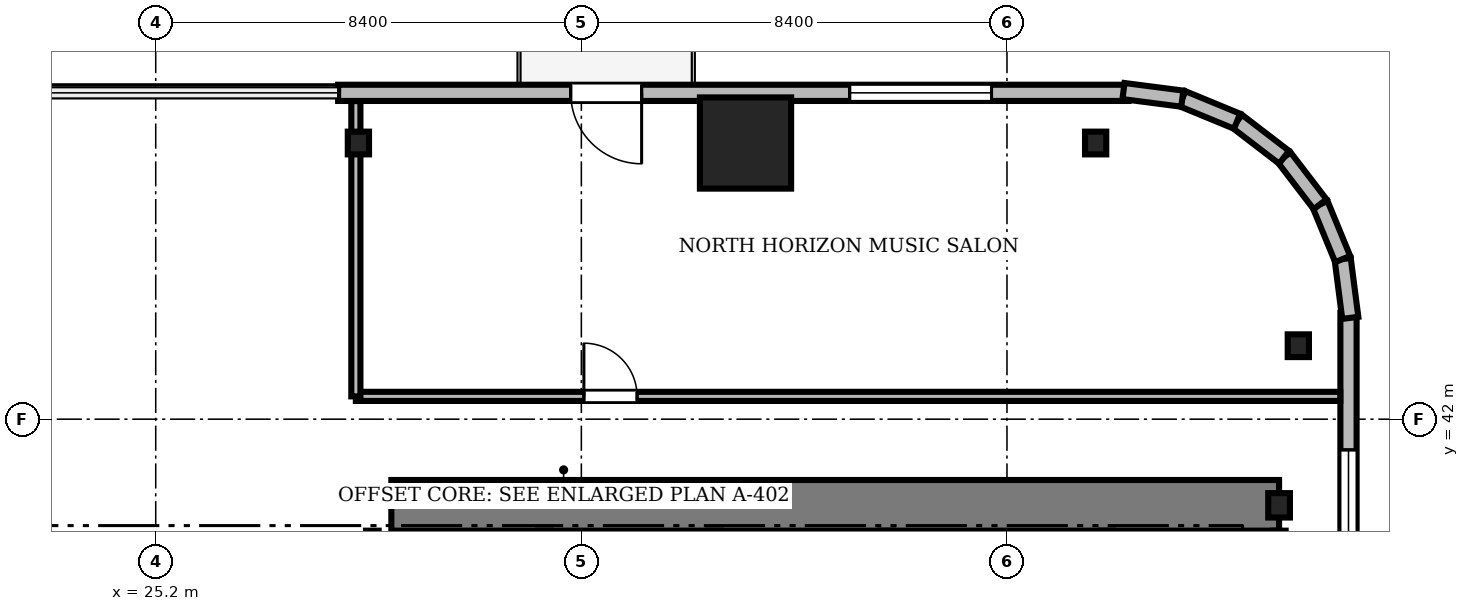
"""IFC4 building model, lengths in metres.
Left out: names, types, materials, properties, quantities, classifications, styles, units other than length and angle.
Written with IfcOpenShell. Run it as: python <this file> out.ifc"""

import sys

from ifc_helpers import new_model, si_unit, direction, frame, frame_2d, origin, origin_2d, place, context, subcontext, project, spatial, rectangle, i_section, extrude, source, transform, mapped, element, fill, save


model = new_model("IFC4")
c1 = context("Model", 3, precision=1e-05, world=origin(), true_north=direction((0.0, 1.0)))
c2 = subcontext(c1, "Body", "Model", "MODEL_VIEW")
j1 = project(units=[si_unit("LENGTHUNIT", "METRE"), si_unit("PLANEANGLEUNIT", "RADIAN")], contexts=[c1])
p1 = place(None, origin())
s1 = spatial("IfcSite", under=j1, at=p1, CompositionType="ELEMENT")
p2 = place(p1, origin())
s2 = spatial("IfcBuilding", under=s1, at=p2, CompositionType="ELEMENT")
p3 = place(p2, frame((0.0, 0.0, 86.0)))
s3 = spatial("IfcBuildingStorey", under=s2, at=p3, CompositionType="ELEMENT", Elevation=86.0)
m1 = source(origin(), c2, "Body", "SweptSolid", [
    extrude(rectangle(XDim=17.52, YDim=1.0, at=frame_2d((8.76, 0.0))), origin(), (0.0, 0.0, 1.0), 3.41),
])
p4 = place(p3, frame((29.85, 40.3, 0.0), z_axis=(0.0, 0.0, 1.0), x_axis=(1.0, 0.0, 0.0)))
e1 = element("IfcWall", 1, at=p4, inside=s3, PredefinedType="SHEAR", context=c2, shape_type="MappedRepresentation", body=[
    mapped(m1, transform((0.0, 0.0, 0.0), scale=1.0)),
])
m2 = source(origin(), c2, "Body", "SweptSolid", [
    extrude(i_section(OverallWidth=0.428, OverallDepth=0.481, WebThickness=0.04, FlangeThickness=0.063, FilletRadius=0.015, at=origin_2d()), origin(), (0.0, 0.0, 1.0), 3.41),
])
p5 = place(p3, frame((47.37, 40.3, 0.0), z_axis=(0.0, 0.0, 1.0), x_axis=(1.0, 0.0, 0.0)))
e2 = element("IfcColumn", 2, at=p5, inside=s3, PredefinedType="COLUMN", context=c2, shape_type="MappedRepresentation", body=[
    mapped(m2, transform((0.0, 0.0, 0.0), scale=1.0)),
])
m3 = source(origin(), c2, "Body", "SweptSolid", [
    extrude(rectangle(XDim=1.8, YDim=1.8, at=origin_2d()), origin(), (0.0, 0.0, 1.0), 3.41),
])
p6 = place(p3, frame((36.84, 47.45, 0.0), z_axis=(0.0, 0.0, 1.0), x_axis=(1.0, 0.0, 0.0)))
e3 = element("IfcColumn", 3, at=p6, inside=s3, PredefinedType="COLUMN", context=c2, shape_type="MappedRepresentation", body=[
    mapped(m3, transform((0.0, 0.0, 0.0), scale=1.0)),
])
m4 = source(origin(), c2, "Body", "SweptSolid", [
    extrude(i_section(OverallWidth=0.419, OverallDepth=0.449, WebThickness=0.031, FlangeThickness=0.048, FilletRadius=0.015, at=origin_2d()), origin(), (0.0, 0.0, 1.0), 3.41),
])
for number, where, z_axis, x_axis in (
    (4, (47.75, 43.45, 0.0), (0.0, 0.0, 1.0), (1.0, 0.0, 0.0)),
    (5, (43.75, 47.45, 0.0), (0.0, 0.0, 1.0), (1.0, 0.0, 0.0)),
    (6, (29.2, 47.45, 0.0), (0.0, 0.0, 1.0), (1.0, 0.0, 0.0)),
):
    element("IfcColumn", number, at=place(p3, frame(where, z_axis=z_axis, x_axis=x_axis)), inside=s3, PredefinedType="COLUMN", context=c2, shape_type="MappedRepresentation", body=[
        mapped(m4, transform((0.0, 0.0, 0.0), scale=1.0)),
    ])
m5 = source(origin(), c2, "Body", "SweptSolid", [
    extrude(rectangle(XDim=15.6, YDim=0.32, at=frame_2d((7.8, 0.0))), origin(), (0.0, 0.0, 1.0), 3.41),
])
p7 = place(p3, frame((44.4, 48.44, 0.0), z_axis=(0.0, 0.0, 1.0), x_axis=(-1.0, 0.0, 0.0)))
e7 = element("IfcWall", 7, at=p7, inside=s3, PredefinedType="SOLIDWALL", context=c2, shape_type="MappedRepresentation", body=[
    mapped(m5, transform((0.0, 0.0, 0.0), scale=1.0)),
])
m6 = source(origin(), c2, "Body", "SweptSolid", [
    extrude(rectangle(XDim=1.4, YDim=2.3, at=frame_2d((0.7, 1.15))), frame((0.0, 0.17, 0.0), z_axis=(0.0, -1.0, 0.0), x_axis=(1.0, 0.0, 0.0)), (0.0, 0.0, 1.0), 0.34),
])
p8 = place(p7, frame((9.61, 0.0, 0.0)))
e8 = element("IfcOpeningElement", 8, at=p8, cuts=e7, PredefinedType="OPENING", context=c2, shape_type="MappedRepresentation", body=[
    mapped(m6, transform((0.0, 0.0, 0.0), scale=1.0)),
])
m7 = source(origin(), c2, "Body", "SweptSolid", [
    extrude(rectangle(XDim=2.8, YDim=2.4, at=frame_2d((1.4, 1.2))), frame((0.0, 0.17, 0.0), z_axis=(0.0, -1.0, 0.0), x_axis=(1.0, 0.0, 0.0)), (0.0, 0.0, 1.0), 0.34),
])
p9 = place(p7, frame((2.705, 0.0, 0.72)))
e9 = element("IfcOpeningElement", 9, at=p9, cuts=e7, PredefinedType="OPENING", context=c2, shape_type="MappedRepresentation", body=[
    mapped(m7, transform((0.0, 0.0, 0.0), scale=1.0)),
])
m8 = source(origin(), c2, "Body", "SweptSolid", [
    extrude(rectangle(XDim=15.6, YDim=0.32, at=frame_2d((7.8, 0.0))), origin(), (0.0, 0.0, 1.0), 3.41),
])
p10 = place(p3, frame((48.74, 28.5, 0.0), z_axis=(0.0, 0.0, 1.0), x_axis=(0.0, 1.0, 0.0)))
e10 = element("IfcWall", 10, at=p10, inside=s3, PredefinedType="SOLIDWALL", context=c2, shape_type="MappedRepresentation", body=[
    mapped(m8, transform((0.0, 0.0, 0.0), scale=1.0)),
])
p11 = place(p10, frame((10.095, 0.0, 0.72)))
e11 = element("IfcOpeningElement", 11, at=p11, cuts=e10, PredefinedType="OPENING", context=c2, shape_type="MappedRepresentation", body=[
    mapped(m7, transform((0.0, 0.0, 0.0), scale=1.0)),
])
m9 = source(origin(), c2, "Body", "SweptSolid", [
    extrude(rectangle(XDim=1.17, YDim=0.32, at=frame_2d((0.585, 0.0))), origin(), (0.0, 0.0, 1.0), 3.41),
])
p12 = place(p3, frame((48.776, 44.0, 0.0), z_axis=(0.0, 0.0, 1.0), x_axis=(-0.128295670475, 0.991735963317, 0.0)))
e12 = element("IfcWall", 12, at=p12, inside=s3, PredefinedType="SOLIDWALL", context=c2, shape_type="MappedRepresentation", body=[
    mapped(m9, transform((0.0, 0.0, 0.0), scale=1.0)),
])
m10 = source(origin(), c2, "Body", "SweptSolid", [
    extrude(rectangle(XDim=1.169, YDim=0.32, at=frame_2d((0.584, 0.0))), origin(), (0.0, 0.0, 1.0), 3.41),
])
p13 = place(p3, frame((48.625, 45.16, 0.0), z_axis=(0.0, 0.0, 1.0), x_axis=(-0.381054331552, 0.924552646638, 0.0)))
e13 = element("IfcWall", 13, at=p13, inside=s3, PredefinedType="SOLIDWALL", context=c2, shape_type="MappedRepresentation", body=[
    mapped(m10, transform((0.0, 0.0, 0.0), scale=1.0)),
])
m11 = source(origin(), c2, "Body", "SweptSolid", [
    extrude(rectangle(XDim=1.169, YDim=0.32, at=frame_2d((0.584, 0.0))), origin(), (0.0, 0.0, 1.0), 3.41),
])
p14 = place(p3, frame((48.18, 46.241, 0.0), z_axis=(0.0, 0.0, 1.0), x_axis=(-0.608387696831, 0.793639975269, 0.0)))
e14 = element("IfcWall", 14, at=p14, inside=s3, PredefinedType="SOLIDWALL", context=c2, shape_type="MappedRepresentation", body=[
    mapped(m11, transform((0.0, 0.0, 0.0), scale=1.0)),
])
m12 = source(origin(), c2, "Body", "SweptSolid", [
    extrude(rectangle(XDim=1.169, YDim=0.32, at=frame_2d((0.584, 0.0))), origin(), (0.0, 0.0, 1.0), 3.41),
])
p15 = place(p3, frame((47.469, 47.169, 0.0), z_axis=(0.0, 0.0, 1.0), x_axis=(-0.793663520347, 0.608356981114, 0.0)))
e15 = element("IfcWall", 15, at=p15, inside=s3, PredefinedType="SOLIDWALL", context=c2, shape_type="MappedRepresentation", body=[
    mapped(m12, transform((0.0, 0.0, 0.0), scale=1.0)),
])
p16 = place(p3, frame((46.541, 47.88, 0.0), z_axis=(0.0, 0.0, 1.0), x_axis=(-0.924552646638, 0.381054331552, 0.0)))
e16 = element("IfcWall", 16, at=p16, inside=s3, PredefinedType="SOLIDWALL", context=c2, shape_type="MappedRepresentation", body=[
    mapped(m10, transform((0.0, 0.0, 0.0), scale=1.0)),
])
p17 = place(p3, frame((45.46, 48.325, 0.0), z_axis=(0.0, 0.0, 1.0), x_axis=(-0.991735963317, 0.128295670475, 0.0)))
e17 = element("IfcWall", 17, at=p17, inside=s3, PredefinedType="SOLIDWALL", context=c2, shape_type="MappedRepresentation", body=[
    mapped(m9, transform((0.0, 0.0, 0.0), scale=1.0)),
])
m13 = source(origin(), c2, "Body", "SweptSolid", [
    extrude(rectangle(XDim=9.15, YDim=0.25, at=frame_2d((4.575, 0.0))), origin(), (0.0, 0.0, 1.0), 3.45),
])
for number, where, z_axis, x_axis in (
    (18, (29.475, 30.65, 0.0), (0.0, 0.0, 1.0), (0.0, 1.0, 0.0)),
    (19, (32.875, 30.65, 0.0), (0.0, 0.0, 1.0), (0.0, 1.0, 0.0)),
    (20, (36.225, 30.65, 0.0), (0.0, 0.0, 1.0), (0.0, 1.0, 0.0)),
    (21, (39.625, 30.65, 0.0), (0.0, 0.0, 1.0), (0.0, 1.0, 0.0)),
    (22, (43.975, 30.65, 0.0), (0.0, 0.0, 1.0), (0.0, 1.0, 0.0)),
    (23, (47.375, 30.65, 0.0), (0.0, 0.0, 1.0), (0.0, 1.0, 0.0)),
):
    element("IfcWall", number, at=place(p3, frame(where, z_axis=z_axis, x_axis=x_axis)), inside=s3, PredefinedType="SOLIDWALL", context=c2, shape_type="MappedRepresentation", body=[
        mapped(m13, transform((0.0, 0.0, 0.0), scale=1.0)),
    ])
m14 = source(origin(), c2, "Body", "SweptSolid", [
    extrude(rectangle(XDim=19.428, YDim=0.18, at=frame_2d((9.714, 0.0))), origin(), (0.0, 0.0, 1.0), 2.652),
])
p18 = place(p3, frame((29.15, 42.45, 0.0), z_axis=(0.0, 0.0, 1.0), x_axis=(1.0, 0.0, 0.0)))
e24 = element("IfcWall", 24, at=p18, inside=s3, PredefinedType="PARTITIONING", context=c2, shape_type="MappedRepresentation", body=[
    mapped(m14, transform((0.0, 0.0, 0.0), scale=1.0)),
])
m15 = source(origin(), c2, "Body", "SweptSolid", [
    extrude(rectangle(XDim=1.05, YDim=2.2, at=frame_2d((0.525, 1.1))), frame((0.0, 0.1, 0.0), z_axis=(0.0, -1.0, 0.0), x_axis=(1.0, 0.0, 0.0)), (0.0, 0.0, 1.0), 0.2),
])
p19 = place(p18, frame((4.5, 0.0, 0.0)))
e25 = element("IfcOpeningElement", 25, at=p19, cuts=e24, PredefinedType="OPENING", context=c2, shape_type="MappedRepresentation", body=[
    mapped(m15, transform((0.0, 0.0, 0.0), scale=1.0)),
])
m16 = source(origin(), c2, "Body", "SweptSolid", [
    extrude(rectangle(XDim=5.828, YDim=0.18, at=frame_2d((2.914, 0.0))), origin(), (0.0, 0.0, 1.0), 2.652),
])
p20 = place(p3, frame((29.15, 42.45, 0.0), z_axis=(0.0, 0.0, 1.0), x_axis=(0.0, 1.0, 0.0)))
e26 = element("IfcWall", 26, at=p20, inside=s3, PredefinedType="PARTITIONING", context=c2, shape_type="MappedRepresentation", body=[
    mapped(m16, transform((0.0, 0.0, 0.0), scale=1.0)),
])
m17 = source(origin(), c2, "Body", "SweptSolid", [
    extrude(rectangle(XDim=1.4, YDim=2.3, at=frame_2d((0.7, 1.15))), frame((0.0, 0.025, 0.0), z_axis=(0.0, -1.0, 0.0), x_axis=(1.0, 0.0, 0.0)), (0.0, 0.0, 1.0), 0.05),
])
p21 = place(p8, frame((1.4, 0.0, 0.0), z_axis=(0.0, 0.0, 1.0), x_axis=(-1.0, 0.0, 0.0)))
e27 = element("IfcDoor", 27, at=p21, inside=s3, OperationType="DOUBLE_DOOR_SLIDING", PredefinedType="DOOR", context=c2, shape_type="MappedRepresentation", body=[
    mapped(m17, transform((0.0, 0.0, 0.0), scale=1.0)),
])
fill(e8, e27)
m18 = source(origin(), c2, "Body", "SweptSolid", [
    extrude(rectangle(XDim=2.8, YDim=2.4, at=frame_2d((1.4, 1.2))), frame((0.0, 0.03, 0.0), z_axis=(0.0, -1.0, 0.0), x_axis=(1.0, 0.0, 0.0)), (0.0, 0.0, 1.0), 0.06),
])
p22 = place(p9, origin())
e28 = element("IfcWindow", 28, at=p22, inside=s3, PartitioningType="SINGLE_PANEL", PredefinedType="WINDOW", context=c2, shape_type="MappedRepresentation", body=[
    mapped(m18, transform((0.0, 0.0, 0.0), scale=1.0)),
])
fill(e9, e28)
p23 = place(p11, origin())
e29 = element("IfcWindow", 29, at=p23, inside=s3, PartitioningType="SINGLE_PANEL", PredefinedType="WINDOW", context=c2, shape_type="MappedRepresentation", body=[
    mapped(m18, transform((0.0, 0.0, 0.0), scale=1.0)),
])
fill(e11, e29)
m19 = source(origin(), c2, "Body", "SweptSolid", [
    extrude(rectangle(XDim=1.05, YDim=2.2, at=frame_2d((0.525, 1.1))), frame((0.0, 0.025, 0.0), z_axis=(0.0, -1.0, 0.0), x_axis=(1.0, 0.0, 0.0)), (0.0, 0.0, 1.0), 0.05),
])
p24 = place(p19, origin())
e30 = element("IfcDoor", 30, at=p24, inside=s3, OperationType="SINGLE_SWING_LEFT", PredefinedType="DOOR", context=c2, shape_type="MappedRepresentation", body=[
    mapped(m19, transform((0.0, 0.0, 0.0), scale=1.0)),
])
fill(e25, e30)
save(model, sys.argv[1])
